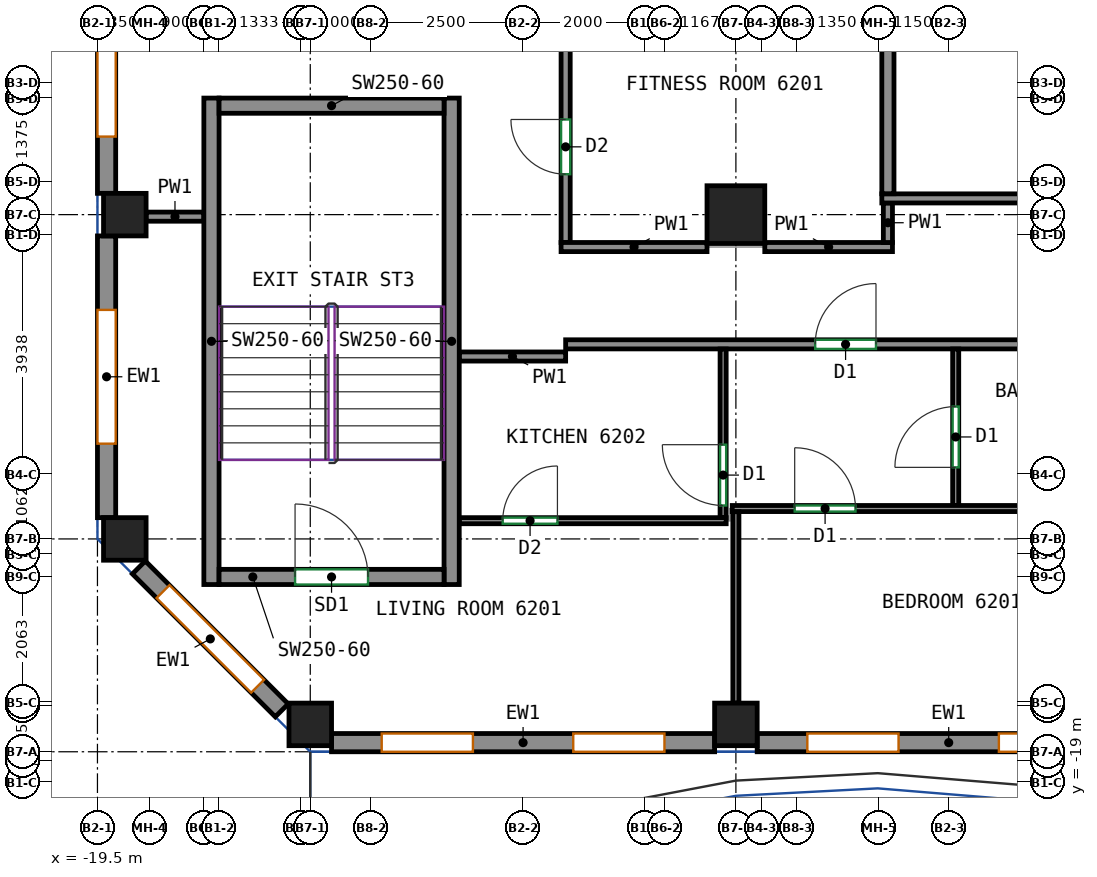
"""IFC4 building model, lengths in metres.
Left out: names, types, materials, properties, quantities, classifications, styles, units other than length and angle.
Written with IfcOpenShell. Run it as: python <this file> out.ifc"""

import sys

from ifc_helpers import new_model, si_unit, direction, frame, frame_2d, origin, origin_2d, place, context, subcontext, project, spatial, rectangle, extrude, source, transform, mapped, element, fill, save


model = new_model("IFC4")
c1 = context("Model", 3, precision=1e-05, world=origin(), true_north=direction((0.0, 1.0)))
c2 = subcontext(c1, "Body", "Model", "MODEL_VIEW")
j1 = project(units=[si_unit("LENGTHUNIT", "METRE"), si_unit("PLANEANGLEUNIT", "RADIAN")], contexts=[c1])
p1 = place(None, origin())
s1 = spatial("IfcSite", under=j1, at=p1, CompositionType="ELEMENT")
p2 = place(p1, origin())
s2 = spatial("IfcBuilding", under=s1, at=p2, CompositionType="ELEMENT")
p3 = place(p2, frame((0.0, 0.0, 256.0)))
s3 = spatial("IfcBuildingStorey", under=s2, at=p3, CompositionType="ELEMENT", Elevation=256.0)
m1 = source(origin(), c2, "Body", "SweptSolid", [
    extrude(rectangle(XDim=0.7, YDim=0.7, at=origin_2d()), origin(), (0.0, 0.0, 1.0), 3.12),
])
for number, where, z_axis, x_axis in (
    (1, (-19.05, -15.0, 0.0), (0.0, 0.0, 1.0), (1.0, 0.0, 0.0)),
    (2, (-19.05, -9.667, 0.0), (0.0, 0.0, 1.0), (1.0, 0.0, 0.0)),
    (3, (-16.0, -18.05, 0.0), (0.0, 0.0, 1.0), (1.0, 0.0, 0.0)),
    (4, (-9.0, -18.05, 0.0), (0.0, 0.0, 1.0), (1.0, 0.0, 0.0)),
):
    element("IfcColumn", number, at=place(p3, frame(where, z_axis=z_axis, x_axis=x_axis)), inside=s3, PredefinedType="COLUMN", context=c2, shape_type="MappedRepresentation", body=[
        mapped(m1, transform((0.0, 0.0, 0.0))),
    ])
m2 = source(origin(), c2, "Body", "SweptSolid", [
    extrude(rectangle(XDim=0.95, YDim=0.95, at=origin_2d()), origin(), (0.0, 0.0, 1.0), 3.12),
])
p4 = place(p3, frame((-9.0, -9.667, 0.0), z_axis=(0.0, 0.0, 1.0), x_axis=(1.0, 0.0, 0.0)))
e5 = element("IfcColumn", 5, at=p4, inside=s3, PredefinedType="COLUMN", context=c2, shape_type="MappedRepresentation", body=[
    mapped(m2, transform((0.0, 0.0, 0.0))),
])
m3 = source(origin(), c2, "Body", "SweptSolid", [
    extrude(rectangle(XDim=8.0, YDim=0.25, at=frame_2d((4.0, 0.0))), origin(), (0.0, 0.0, 1.0), 3.12),
])
for number, where, z_axis, x_axis in (
    (6, (-17.625, -15.75, 0.0), (0.0, 0.0, 1.0), (0.0, 1.0, 0.0)),
    (7, (-13.675, -15.75, 0.0), (0.0, 0.0, 1.0), (0.0, 1.0, 0.0)),
):
    element("IfcWall", number, at=place(p3, frame(where, z_axis=z_axis, x_axis=x_axis)), inside=s3, PredefinedType="SHEAR", context=c2, shape_type="MappedRepresentation", body=[
        mapped(m3, transform((0.0, 0.0, 0.0))),
    ])
m4 = source(origin(), c2, "Body", "SweptSolid", [
    extrude(rectangle(XDim=3.7, YDim=0.25, at=frame_2d((1.85, 0.0))), origin(), (0.0, 0.0, 1.0), 3.12),
])
p5 = place(p3, frame((-17.5, -15.625, 0.0), z_axis=(0.0, 0.0, 1.0), x_axis=(1.0, 0.0, 0.0)))
e8 = element("IfcWall", 8, at=p5, inside=s3, PredefinedType="SHEAR", context=c2, shape_type="MappedRepresentation", body=[
    mapped(m4, transform((0.0, 0.0, 0.0))),
])
p6 = place(p5, frame((1.25, 0.0, 0.0)))
e9 = element("IfcOpeningElement", 9, at=p6, cuts=e8, PredefinedType="OPENING", context=c2, shape_type="SweptSolid", body=[
    extrude(rectangle(XDim=1.2, YDim=2.1, at=frame_2d((0.6, 1.05))), frame((0.0, 0.135, 0.0), z_axis=(0.0, -1.0, 0.0), x_axis=(1.0, 0.0, 0.0)), (0.0, 0.0, 1.0), 0.27),
])
p7 = place(p3, frame((-17.5, -7.875, 0.0), z_axis=(0.0, 0.0, 1.0), x_axis=(1.0, 0.0, 0.0)))
e10 = element("IfcWall", 10, at=p7, inside=s3, PredefinedType="SHEAR", context=c2, shape_type="MappedRepresentation", body=[
    mapped(m4, transform((0.0, 0.0, 0.0))),
])
m5 = source(origin(), c2, "Body", "SweptSolid", [
    extrude(rectangle(XDim=6.3, YDim=0.3, at=frame_2d((3.15, 0.0))), origin(), (0.0, 0.0, 1.0), 3.12),
])
p8 = place(p3, frame((-15.65, -18.35, 0.0), z_axis=(0.0, 0.0, 1.0), x_axis=(1.0, 0.0, 0.0)))
e11 = element("IfcWall", 11, at=p8, inside=s3, PredefinedType="SOLIDWALL", context=c2, shape_type="MappedRepresentation", body=[
    mapped(m5, transform((0.0, 0.0, 0.0))),
])
p9 = place(p8, frame((0.825, 0.0, 0.8)))
e12 = element("IfcOpeningElement", 12, at=p9, cuts=e11, PredefinedType="OPENING", context=c2, shape_type="SweptSolid", body=[
    extrude(rectangle(XDim=1.5, YDim=2.05, at=frame_2d((0.75, 1.025))), frame((0.0, 0.16, 0.0), z_axis=(0.0, -1.0, 0.0), x_axis=(1.0, 0.0, 0.0)), (0.0, 0.0, 1.0), 0.32),
])
p10 = place(p8, frame((3.975, 0.0, 0.8)))
e13 = element("IfcOpeningElement", 13, at=p10, cuts=e11, PredefinedType="OPENING", context=c2, shape_type="SweptSolid", body=[
    extrude(rectangle(XDim=1.5, YDim=2.05, at=frame_2d((0.75, 1.025))), frame((0.0, 0.16, 0.0), z_axis=(0.0, -1.0, 0.0), x_axis=(1.0, 0.0, 0.0)), (0.0, 0.0, 1.0), 0.32),
])
p11 = place(p3, frame((-8.65, -18.35, 0.0), z_axis=(0.0, 0.0, 1.0), x_axis=(1.0, 0.0, 0.0)))
e14 = element("IfcWall", 14, at=p11, inside=s3, PredefinedType="SOLIDWALL", context=c2, shape_type="MappedRepresentation", body=[
    mapped(m5, transform((0.0, 0.0, 0.0))),
])
p12 = place(p11, frame((0.825, 0.0, 0.8)))
e15 = element("IfcOpeningElement", 15, at=p12, cuts=e14, PredefinedType="OPENING", context=c2, shape_type="SweptSolid", body=[
    extrude(rectangle(XDim=1.5, YDim=2.05, at=frame_2d((0.75, 1.025))), frame((0.0, 0.16, 0.0), z_axis=(0.0, -1.0, 0.0), x_axis=(1.0, 0.0, 0.0)), (0.0, 0.0, 1.0), 0.32),
])
p13 = place(p11, frame((3.975, 0.0, 0.8)))
e16 = element("IfcOpeningElement", 16, at=p13, cuts=e14, PredefinedType="OPENING", context=c2, shape_type="SweptSolid", body=[
    extrude(rectangle(XDim=1.5, YDim=2.05, at=frame_2d((0.75, 1.025))), frame((0.0, 0.16, 0.0), z_axis=(0.0, -1.0, 0.0), x_axis=(1.0, 0.0, 0.0)), (0.0, 0.0, 1.0), 0.32),
])
m6 = source(origin(), c2, "Body", "SweptSolid", [
    extrude(rectangle(XDim=8.133, YDim=0.3, at=frame_2d((4.067, 0.0))), origin(), (0.0, 0.0, 1.0), 3.12),
])
p14 = place(p3, frame((-19.35, -1.183, 0.0), z_axis=(0.0, 0.0, 1.0), x_axis=(0.0, -1.0, 0.0)))
e17 = element("IfcWall", 17, at=p14, inside=s3, PredefinedType="SOLIDWALL", context=c2, shape_type="MappedRepresentation", body=[
    mapped(m6, transform((0.0, 0.0, 0.0))),
])
p15 = place(p14, frame((0.933, 0.0, 0.8)))
e18 = element("IfcOpeningElement", 18, at=p15, cuts=e17, PredefinedType="OPENING", context=c2, shape_type="SweptSolid", body=[
    extrude(rectangle(XDim=2.2, YDim=2.05, at=frame_2d((1.1, 1.025))), frame((0.0, 0.16, 0.0), z_axis=(0.0, -1.0, 0.0), x_axis=(1.0, 0.0, 0.0)), (0.0, 0.0, 1.0), 0.32),
])
p16 = place(p14, frame((5.0, 0.0, 0.8)))
e19 = element("IfcOpeningElement", 19, at=p16, cuts=e17, PredefinedType="OPENING", context=c2, shape_type="SweptSolid", body=[
    extrude(rectangle(XDim=2.2, YDim=2.05, at=frame_2d((1.1, 1.025))), frame((0.0, 0.16, 0.0), z_axis=(0.0, -1.0, 0.0), x_axis=(1.0, 0.0, 0.0)), (0.0, 0.0, 1.0), 0.32),
])
m7 = source(origin(), c2, "Body", "SweptSolid", [
    extrude(rectangle(XDim=4.633, YDim=0.3, at=frame_2d((2.317, 0.0))), origin(), (0.0, 0.0, 1.0), 3.12),
])
p17 = place(p3, frame((-19.35, -10.017, 0.0), z_axis=(0.0, 0.0, 1.0), x_axis=(0.0, -1.0, 0.0)))
e20 = element("IfcWall", 20, at=p17, inside=s3, PredefinedType="SOLIDWALL", context=c2, shape_type="MappedRepresentation", body=[
    mapped(m7, transform((0.0, 0.0, 0.0))),
])
p18 = place(p17, frame((1.217, 0.0, 0.8)))
e21 = element("IfcOpeningElement", 21, at=p18, cuts=e20, PredefinedType="OPENING", context=c2, shape_type="SweptSolid", body=[
    extrude(rectangle(XDim=2.2, YDim=2.05, at=frame_2d((1.1, 1.025))), frame((0.0, 0.16, 0.0), z_axis=(0.0, -1.0, 0.0), x_axis=(1.0, 0.0, 0.0)), (0.0, 0.0, 1.0), 0.32),
])
m8 = source(origin(), c2, "Body", "SweptSolid", [
    extrude(rectangle(XDim=3.323, YDim=0.3, at=frame_2d((1.662, 0.0))), origin(), (0.0, 0.0, 1.0), 3.12),
])
p19 = place(p3, frame((-18.819, -15.469, 0.0), z_axis=(0.0, 0.0, 1.0), x_axis=(0.707070049321, -0.707143511144, 0.0)))
e22 = element("IfcWall", 22, at=p19, inside=s3, PredefinedType="SOLIDWALL", context=c2, shape_type="MappedRepresentation", body=[
    mapped(m8, transform((0.0, 0.0, 0.0))),
])
p20 = place(p19, frame((0.562, 0.0, 0.8)))
e23 = element("IfcOpeningElement", 23, at=p20, cuts=e22, PredefinedType="OPENING", context=c2, shape_type="SweptSolid", body=[
    extrude(rectangle(XDim=2.2, YDim=2.05, at=frame_2d((1.1, 1.025))), frame((0.0, 0.16, 0.0), z_axis=(0.0, -1.0, 0.0), x_axis=(1.0, 0.0, 0.0)), (0.0, 0.0, 1.0), 0.32),
])
p21 = place(p3, frame((-11.8, -11.8, 0.0), z_axis=(0.0, 0.0, 1.0), x_axis=(1.0, 0.0, 0.0)))
e24 = element("IfcWall", 24, at=p21, inside=s3, PredefinedType="PARTITIONING", context=c2, shape_type="SweptSolid", body=[
    extrude(rectangle(XDim=27.31, YDim=0.15, at=frame_2d((13.655, 0.0))), origin(), (0.0, 0.0, 1.0), 3.12),
])
p22 = place(p21, frame((4.104, 0.0, 0.0)))
e25 = element("IfcOpeningElement", 25, at=p22, cuts=e24, PredefinedType="OPENING", context=c2, shape_type="SweptSolid", body=[
    extrude(rectangle(XDim=1.0, YDim=2.1, at=frame_2d((0.5, 1.05))), frame((0.0, 0.085, 0.0), z_axis=(0.0, -1.0, 0.0), x_axis=(1.0, 0.0, 0.0)), (0.0, 0.0, 1.0), 0.17),
])
p23 = place(p21, frame((18.767, 0.0, 0.0)))
e26 = element("IfcOpeningElement", 26, at=p23, cuts=e24, PredefinedType="OPENING", context=c2, shape_type="SweptSolid", body=[
    extrude(rectangle(XDim=1.0, YDim=2.1, at=frame_2d((0.5, 1.05))), frame((0.0, 0.085, 0.0), z_axis=(0.0, -1.0, 0.0), x_axis=(1.0, 0.0, 0.0)), (0.0, 0.0, 1.0), 0.17),
])
p24 = place(p3, frame((-13.55, -12.0, 0.0), z_axis=(0.0, 0.0, 1.0), x_axis=(1.0, 0.0, 0.0)))
e27 = element("IfcWall", 27, at=p24, inside=s3, PredefinedType="PARTITIONING", context=c2, shape_type="SweptSolid", body=[
    extrude(rectangle(XDim=1.75, YDim=0.15, at=frame_2d((0.875, 0.0))), origin(), (0.0, 0.0, 1.0), 3.12),
])
p25 = place(p3, frame((-18.7, -9.7, 0.0), z_axis=(0.0, 0.0, 1.0), x_axis=(1.0, 0.0, 0.0)))
e28 = element("IfcWall", 28, at=p25, inside=s3, PredefinedType="PARTITIONING", context=c2, shape_type="SweptSolid", body=[
    extrude(rectangle(XDim=0.95, YDim=0.15, at=frame_2d((0.475, 0.0))), origin(), (0.0, 0.0, 1.0), 3.12),
])
p26 = place(p3, frame((-11.8, -10.125, 0.0), z_axis=(0.0, 0.0, 1.0), x_axis=(0.0, 1.0, 0.0)))
e29 = element("IfcWall", 29, at=p26, inside=s3, PredefinedType="PARTITIONING", context=c2, shape_type="SweptSolid", body=[
    extrude(rectangle(XDim=4.785, YDim=0.15, at=frame_2d((2.393, 0.0))), origin(), (0.0, 0.0, 1.0), 3.12),
])
p27 = place(p26, frame((1.123, 0.0, 0.0)))
e30 = element("IfcOpeningElement", 30, at=p27, cuts=e29, PredefinedType="OPENING", context=c2, shape_type="SweptSolid", body=[
    extrude(rectangle(XDim=0.9, YDim=2.1, at=frame_2d((0.45, 1.05))), frame((0.0, 0.085, 0.0), z_axis=(0.0, -1.0, 0.0), x_axis=(1.0, 0.0, 0.0)), (0.0, 0.0, 1.0), 0.17),
])
p28 = place(p3, frame((-8.525, -10.2, 0.0), z_axis=(0.0, 0.0, 1.0), x_axis=(1.0, 0.0, 0.0)))
e31 = element("IfcWall", 31, at=p28, inside=s3, PredefinedType="PARTITIONING", context=c2, shape_type="SweptSolid", body=[
    extrude(rectangle(XDim=2.1, YDim=0.15, at=frame_2d((1.05, 0.0))), origin(), (0.0, 0.0, 1.0), 3.12),
])
p29 = place(p3, frame((-11.875, -10.2, 0.0), z_axis=(0.0, 0.0, 1.0), x_axis=(1.0, 0.0, 0.0)))
e32 = element("IfcWall", 32, at=p29, inside=s3, PredefinedType="PARTITIONING", context=c2, shape_type="SweptSolid", body=[
    extrude(rectangle(XDim=2.4, YDim=0.15, at=frame_2d((1.2, 0.0))), origin(), (0.0, 0.0, 1.0), 3.12),
])
p30 = place(p3, frame((-6.5, -10.125, 0.0), z_axis=(0.0, 0.0, 1.0), x_axis=(0.0, 1.0, 0.0)))
e33 = element("IfcWall", 33, at=p30, inside=s3, PredefinedType="PARTITIONING", context=c2, shape_type="SweptSolid", body=[
    extrude(rectangle(XDim=0.65, YDim=0.15, at=frame_2d((0.325, 0.0))), origin(), (0.0, 0.0, 1.0), 3.12),
])
p31 = place(p3, frame((8.575, -9.4, 0.0), z_axis=(0.0, 0.0, 1.0), x_axis=(-1.0, 0.0, 0.0)))
e34 = element("IfcWall", 34, at=p31, inside=s3, PredefinedType="PARTITIONING", context=c2, shape_type="SweptSolid", body=[
    extrude(rectangle(XDim=15.175, YDim=0.15, at=frame_2d((7.587, 0.0))), origin(), (0.0, 0.0, 1.0), 3.12),
])
p32 = place(p31, frame((0.502, 0.0, 0.0)))
e35 = element("IfcOpeningElement", 35, at=p32, cuts=e34, PredefinedType="OPENING", context=c2, shape_type="SweptSolid", body=[
    extrude(rectangle(XDim=1.0, YDim=2.1, at=frame_2d((0.5, 1.05))), frame((0.0, 0.085, 0.0), z_axis=(0.0, -1.0, 0.0), x_axis=(1.0, 0.0, 0.0)), (0.0, 0.0, 1.0), 0.17),
])
p33 = place(p3, frame((-9.21, -14.65, 0.0), z_axis=(0.0, 0.0, 1.0), x_axis=(0.0, 1.0, 0.0)))
e36 = element("IfcWall", 36, at=p33, inside=s3, PredefinedType="PARTITIONING", context=c2, shape_type="SweptSolid", body=[
    extrude(rectangle(XDim=2.773, YDim=0.1, at=frame_2d((1.386, 0.0))), origin(), (0.0, 0.0, 1.0), 3.12),
])
p34 = place(p33, frame((0.2, 0.0, 0.0)))
e37 = element("IfcOpeningElement", 37, at=p34, cuts=e36, PredefinedType="OPENING", context=c2, shape_type="SweptSolid", body=[
    extrude(rectangle(XDim=1.0, YDim=2.1, at=frame_2d((0.5, 1.05))), frame((0.0, 0.06, 0.0), z_axis=(0.0, -1.0, 0.0), x_axis=(1.0, 0.0, 0.0)), (0.0, 0.0, 1.0), 0.12),
])
p35 = place(p3, frame((-13.55, -14.7, 0.0), z_axis=(0.0, 0.0, 1.0), x_axis=(1.0, 0.0, 0.0)))
e38 = element("IfcWall", 38, at=p35, inside=s3, PredefinedType="PARTITIONING", context=c2, shape_type="SweptSolid", body=[
    extrude(rectangle(XDim=4.39, YDim=0.1, at=frame_2d((2.195, 0.0))), origin(), (0.0, 0.0, 1.0), 3.12),
])
p36 = place(p35, frame((0.715, 0.0, 0.0)))
e39 = element("IfcOpeningElement", 39, at=p36, cuts=e38, PredefinedType="OPENING", context=c2, shape_type="SweptSolid", body=[
    extrude(rectangle(XDim=0.9, YDim=2.1, at=frame_2d((0.45, 1.05))), frame((0.0, 0.06, 0.0), z_axis=(0.0, -1.0, 0.0), x_axis=(1.0, 0.0, 0.0)), (0.0, 0.0, 1.0), 0.12),
])
p37 = place(p3, frame((-5.385, -14.45, 0.0), z_axis=(0.0, 0.0, 1.0), x_axis=(0.0, 1.0, 0.0)))
e40 = element("IfcWall", 40, at=p37, inside=s3, PredefinedType="PARTITIONING", context=c2, shape_type="SweptSolid", body=[
    extrude(rectangle(XDim=2.573, YDim=0.1, at=frame_2d((1.287, 0.0))), origin(), (0.0, 0.0, 1.0), 3.12),
])
p38 = place(p37, frame((0.627, 0.0, 0.0)))
e41 = element("IfcOpeningElement", 41, at=p38, cuts=e40, PredefinedType="OPENING", context=c2, shape_type="SweptSolid", body=[
    extrude(rectangle(XDim=1.0, YDim=2.1, at=frame_2d((0.5, 1.05))), frame((0.0, 0.06, 0.0), z_axis=(0.0, -1.0, 0.0), x_axis=(1.0, 0.0, 0.0)), (0.0, 0.0, 1.0), 0.12),
])
p39 = place(p3, frame((-9.06, -14.5, 0.0), z_axis=(0.0, 0.0, 1.0), x_axis=(1.0, 0.0, 0.0)))
e42 = element("IfcWall", 42, at=p39, inside=s3, PredefinedType="PARTITIONING", context=c2, shape_type="SweptSolid", body=[
    extrude(rectangle(XDim=24.66, YDim=0.1, at=frame_2d((12.33, 0.0))), origin(), (0.0, 0.0, 1.0), 3.12),
])
p40 = place(p39, frame((1.027, 0.0, 0.0)))
e43 = element("IfcOpeningElement", 43, at=p40, cuts=e42, PredefinedType="OPENING", context=c2, shape_type="SweptSolid", body=[
    extrude(rectangle(XDim=1.0, YDim=2.1, at=frame_2d((0.5, 1.05))), frame((0.0, 0.06, 0.0), z_axis=(0.0, -1.0, 0.0), x_axis=(1.0, 0.0, 0.0)), (0.0, 0.0, 1.0), 0.12),
])
p41 = place(p39, frame((15.732, 0.0, 0.0)))
e44 = element("IfcOpeningElement", 44, at=p41, cuts=e42, PredefinedType="OPENING", context=c2, shape_type="SweptSolid", body=[
    extrude(rectangle(XDim=1.0, YDim=2.1, at=frame_2d((0.5, 1.05))), frame((0.0, 0.06, 0.0), z_axis=(0.0, -1.0, 0.0), x_axis=(1.0, 0.0, 0.0)), (0.0, 0.0, 1.0), 0.12),
])
p42 = place(p39, frame((18.494, 0.0, 0.0)))
e45 = element("IfcOpeningElement", 45, at=p42, cuts=e42, PredefinedType="OPENING", context=c2, shape_type="SweptSolid", body=[
    extrude(rectangle(XDim=1.0, YDim=2.1, at=frame_2d((0.5, 1.05))), frame((0.0, 0.06, 0.0), z_axis=(0.0, -1.0, 0.0), x_axis=(1.0, 0.0, 0.0)), (0.0, 0.0, 1.0), 0.12),
])
p43 = place(p3, frame((-9.0, -17.7, 0.0), z_axis=(0.0, 0.0, 1.0), x_axis=(0.0, 1.0, 0.0)))
e46 = element("IfcWall", 46, at=p43, inside=s3, PredefinedType="PARTITIONING", context=c2, shape_type="SweptSolid", body=[
    extrude(rectangle(XDim=3.148, YDim=0.1, at=frame_2d((1.574, 0.0))), origin(), (0.0, 0.0, 1.0), 3.12),
])
p44 = place(p3, frame((-6.5, -9.323, 0.0), z_axis=(0.0, 0.0, 1.0), x_axis=(0.0, 1.0, 0.0)))
e47 = element("IfcWall", 47, at=p44, inside=s3, PredefinedType="PARTITIONING", context=c2, shape_type="SweptSolid", body=[
    extrude(rectangle(XDim=8.39, YDim=0.2, at=frame_2d((4.195, 0.0))), origin(), (0.0, 0.0, 1.0), 3.12),
])
p45 = place(p9, origin())
e48 = element("IfcWindow", 48, at=p45, inside=s3, PartitioningType="SINGLE_PANEL", PredefinedType="WINDOW", context=c2, shape_type="SweptSolid", body=[
    extrude(rectangle(XDim=1.5, YDim=2.05, at=frame_2d((0.75, 1.025))), frame((0.0, 0.03, 0.0), z_axis=(0.0, -1.0, 0.0), x_axis=(1.0, 0.0, 0.0)), (0.0, 0.0, 1.0), 0.06),
])
fill(e12, e48)
p46 = place(p10, origin())
e49 = element("IfcWindow", 49, at=p46, inside=s3, PartitioningType="SINGLE_PANEL", PredefinedType="WINDOW", context=c2, shape_type="SweptSolid", body=[
    extrude(rectangle(XDim=1.5, YDim=2.05, at=frame_2d((0.75, 1.025))), frame((0.0, 0.03, 0.0), z_axis=(0.0, -1.0, 0.0), x_axis=(1.0, 0.0, 0.0)), (0.0, 0.0, 1.0), 0.06),
])
fill(e13, e49)
p47 = place(p12, origin())
e50 = element("IfcWindow", 50, at=p47, inside=s3, PartitioningType="SINGLE_PANEL", PredefinedType="WINDOW", context=c2, shape_type="SweptSolid", body=[
    extrude(rectangle(XDim=1.5, YDim=2.05, at=frame_2d((0.75, 1.025))), frame((0.0, 0.03, 0.0), z_axis=(0.0, -1.0, 0.0), x_axis=(1.0, 0.0, 0.0)), (0.0, 0.0, 1.0), 0.06),
])
fill(e15, e50)
p48 = place(p13, origin())
e51 = element("IfcWindow", 51, at=p48, inside=s3, PartitioningType="SINGLE_PANEL", PredefinedType="WINDOW", context=c2, shape_type="SweptSolid", body=[
    extrude(rectangle(XDim=1.5, YDim=2.05, at=frame_2d((0.75, 1.025))), frame((0.0, 0.03, 0.0), z_axis=(0.0, -1.0, 0.0), x_axis=(1.0, 0.0, 0.0)), (0.0, 0.0, 1.0), 0.06),
])
fill(e16, e51)
p49 = place(p16, origin())
e52 = element("IfcWindow", 52, at=p49, inside=s3, PartitioningType="SINGLE_PANEL", PredefinedType="WINDOW", context=c2, shape_type="SweptSolid", body=[
    extrude(rectangle(XDim=2.2, YDim=2.05, at=frame_2d((1.1, 1.025))), frame((0.0, 0.03, 0.0), z_axis=(0.0, -1.0, 0.0), x_axis=(1.0, 0.0, 0.0)), (0.0, 0.0, 1.0), 0.06),
])
fill(e19, e52)
p50 = place(p18, origin())
e53 = element("IfcWindow", 53, at=p50, inside=s3, PartitioningType="SINGLE_PANEL", PredefinedType="WINDOW", context=c2, shape_type="SweptSolid", body=[
    extrude(rectangle(XDim=2.2, YDim=2.05, at=frame_2d((1.1, 1.025))), frame((0.0, 0.03, 0.0), z_axis=(0.0, -1.0, 0.0), x_axis=(1.0, 0.0, 0.0)), (0.0, 0.0, 1.0), 0.06),
])
fill(e21, e53)
p51 = place(p20, origin())
e54 = element("IfcWindow", 54, at=p51, inside=s3, PartitioningType="SINGLE_PANEL", PredefinedType="WINDOW", context=c2, shape_type="SweptSolid", body=[
    extrude(rectangle(XDim=2.2, YDim=2.05, at=frame_2d((1.1, 1.025))), frame((0.0, 0.03, 0.0), z_axis=(0.0, -1.0, 0.0), x_axis=(1.0, 0.0, 0.0)), (0.0, 0.0, 1.0), 0.06),
])
fill(e23, e54)
p52 = place(p6, origin())
e55 = element("IfcDoor", 55, at=p52, inside=s3, OperationType="DOUBLE_DOOR_SINGLE_SWING", PredefinedType="DOOR", context=c2, shape_type="SweptSolid", body=[
    extrude(rectangle(XDim=1.2, YDim=2.1, at=frame_2d((0.6, 1.05))), frame((0.0, 0.025, 0.0), z_axis=(0.0, -1.0, 0.0), x_axis=(1.0, 0.0, 0.0)), (0.0, 0.0, 1.0), 0.05),
])
fill(e9, e55)
p53 = place(p36, origin())
e56 = element("IfcDoor", 56, at=p53, inside=s3, OperationType="SINGLE_SWING_RIGHT", PredefinedType="DOOR", context=c2, shape_type="SweptSolid", body=[
    extrude(rectangle(XDim=0.9, YDim=2.1, at=frame_2d((0.45, 1.05))), frame((0.0, 0.025, 0.0), z_axis=(0.0, -1.0, 0.0), x_axis=(1.0, 0.0, 0.0)), (0.0, 0.0, 1.0), 0.05),
])
fill(e39, e56)
p54 = place(p40, origin())
e57 = element("IfcDoor", 57, at=p54, inside=s3, OperationType="SINGLE_SWING_LEFT", PredefinedType="DOOR", context=c2, shape_type="SweptSolid", body=[
    extrude(rectangle(XDim=1.0, YDim=2.1, at=frame_2d((0.5, 1.05))), frame((0.0, 0.025, 0.0), z_axis=(0.0, -1.0, 0.0), x_axis=(1.0, 0.0, 0.0)), (0.0, 0.0, 1.0), 0.05),
])
fill(e43, e57)
p55 = place(p34, origin())
e58 = element("IfcDoor", 58, at=p55, inside=s3, OperationType="SINGLE_SWING_RIGHT", PredefinedType="DOOR", context=c2, shape_type="SweptSolid", body=[
    extrude(rectangle(XDim=1.0, YDim=2.1, at=frame_2d((0.5, 1.05))), frame((0.0, 0.025, 0.0), z_axis=(0.0, -1.0, 0.0), x_axis=(1.0, 0.0, 0.0)), (0.0, 0.0, 1.0), 0.05),
])
fill(e37, e58)
p56 = place(p38, origin())
e59 = element("IfcDoor", 59, at=p56, inside=s3, OperationType="SINGLE_SWING_LEFT", PredefinedType="DOOR", context=c2, shape_type="SweptSolid", body=[
    extrude(rectangle(XDim=1.0, YDim=2.1, at=frame_2d((0.5, 1.05))), frame((0.0, 0.025, 0.0), z_axis=(0.0, -1.0, 0.0), x_axis=(1.0, 0.0, 0.0)), (0.0, 0.0, 1.0), 0.05),
])
fill(e41, e59)
p57 = place(p22, origin())
e60 = element("IfcDoor", 60, at=p57, inside=s3, OperationType="SINGLE_SWING_RIGHT", PredefinedType="DOOR", context=c2, shape_type="SweptSolid", body=[
    extrude(rectangle(XDim=1.0, YDim=2.1, at=frame_2d((0.5, 1.05))), frame((0.0, 0.025, 0.0), z_axis=(0.0, -1.0, 0.0), x_axis=(1.0, 0.0, 0.0)), (0.0, 0.0, 1.0), 0.05),
])
fill(e25, e60)
p58 = place(p27, origin())
e61 = element("IfcDoor", 61, at=p58, inside=s3, OperationType="SINGLE_SWING_RIGHT", PredefinedType="DOOR", context=c2, shape_type="SweptSolid", body=[
    extrude(rectangle(XDim=0.9, YDim=2.1, at=frame_2d((0.45, 1.05))), frame((0.0, 0.025, 0.0), z_axis=(0.0, -1.0, 0.0), x_axis=(1.0, 0.0, 0.0)), (0.0, 0.0, 1.0), 0.05),
])
fill(e30, e61)
save(model, sys.argv[1])
